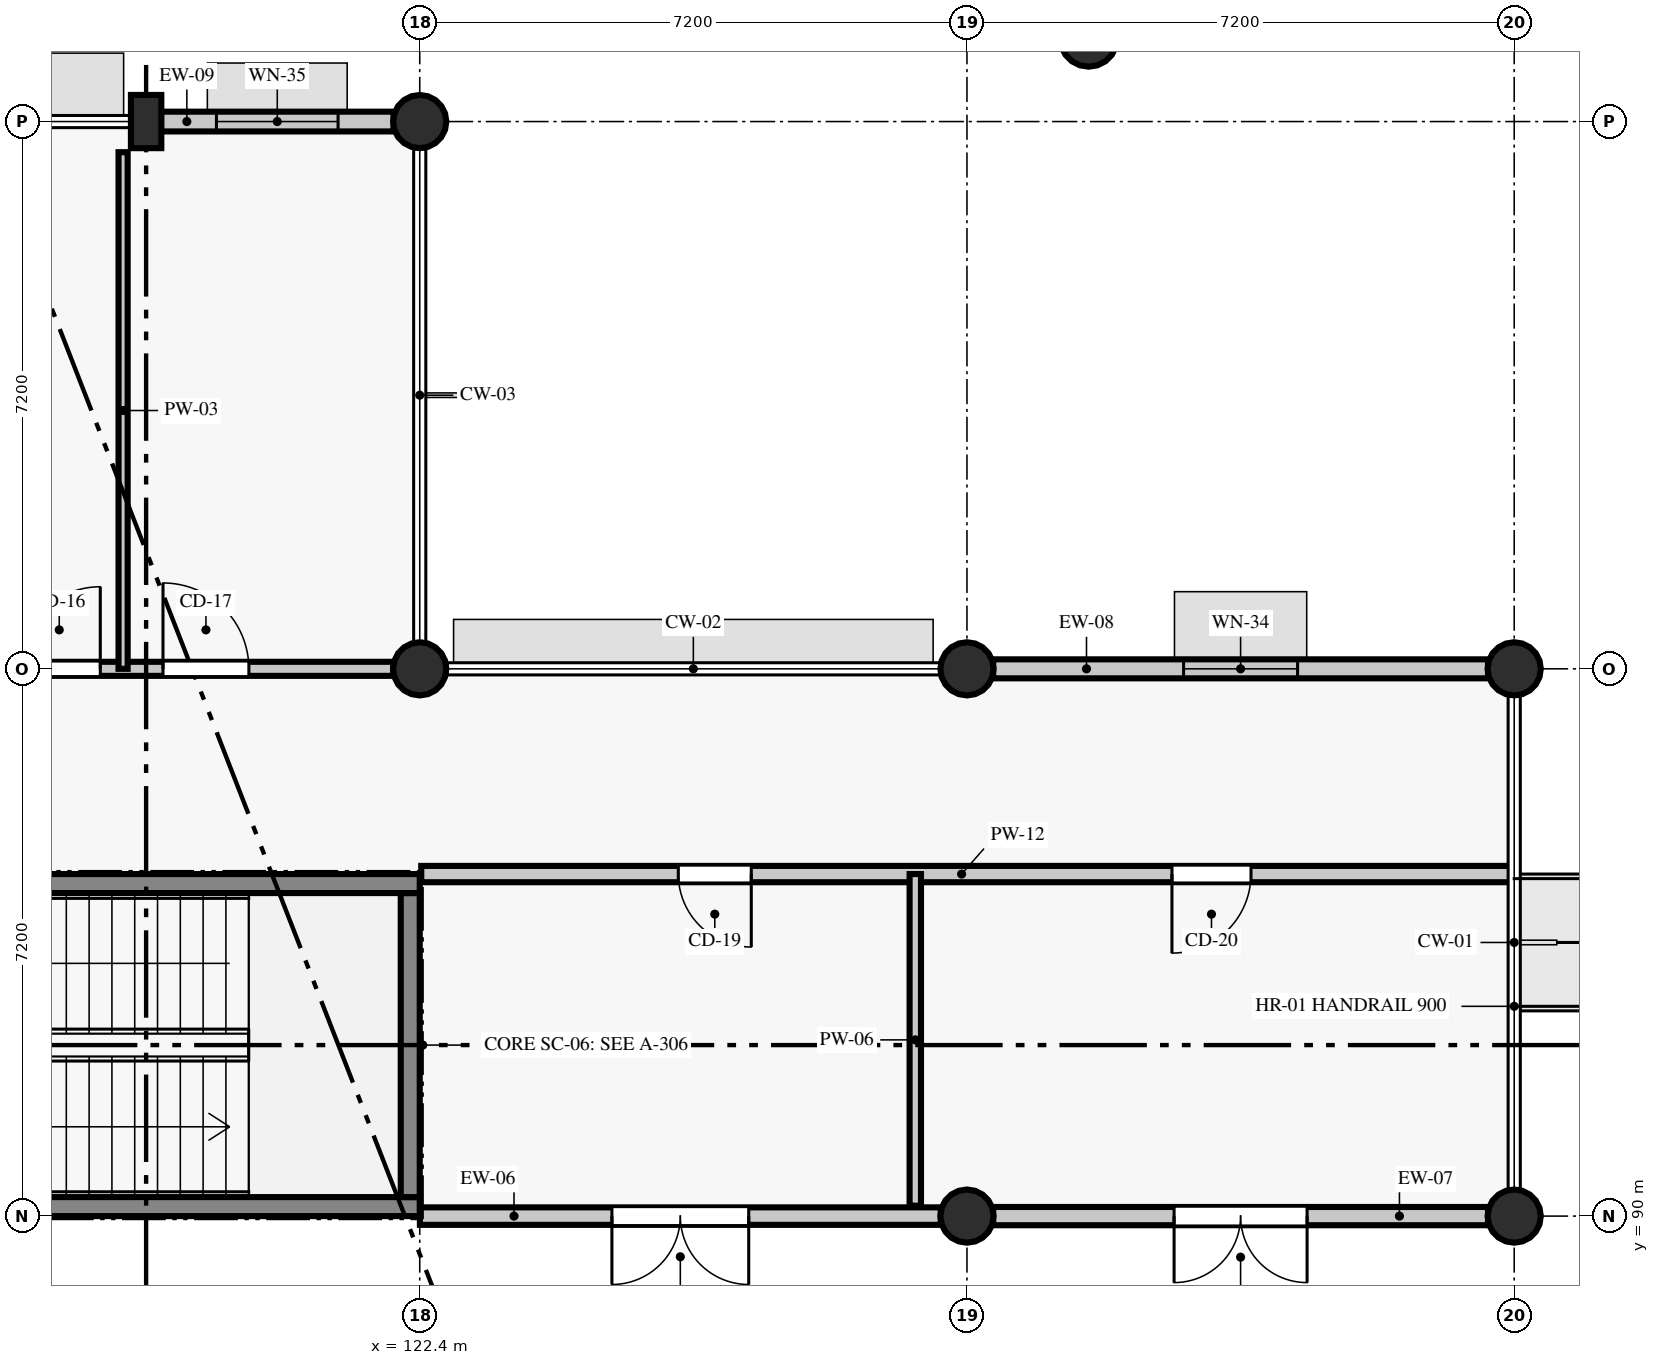
"""IFC4 building model, lengths in metres.
Left out: names, types, materials, properties, quantities, classifications, styles, units other than length and angle.
Written with IfcOpenShell. Run it as: python <this file> out.ifc"""

import sys

from ifc_helpers import new_model, si_unit, direction, frame, frame_2d, origin, origin_2d, place, context, subcontext, project, spatial, rectangle, circle, extrude, element, fill, save


model = new_model("IFC4")
c1 = context("Model", 3, precision=1e-05, world=origin(), true_north=direction((0.0, 1.0)))
c2 = subcontext(c1, "Body", "Model", "MODEL_VIEW")
j1 = project(units=[si_unit("LENGTHUNIT", "METRE"), si_unit("PLANEANGLEUNIT", "RADIAN")], contexts=[c1])
p1 = place(None, origin())
s1 = spatial("IfcSite", under=j1, at=p1, CompositionType="ELEMENT")
p2 = place(p1, origin())
s2 = spatial("IfcBuilding", under=s1, at=p2, CompositionType="ELEMENT")
p3 = place(p2, origin())
s3 = spatial("IfcBuildingStorey", under=s2, at=p3, CompositionType="ELEMENT", Elevation=0.0)
for number, where, z_axis, x_axis in (
    (1, (122.4, 97.2, 0.0), (0.0, 0.0, 1.0), (1.0, 0.0, 0.0)),
    (2, (122.4, 104.4, 0.0), (0.0, 0.0, 1.0), (1.0, 0.0, 0.0)),
    (3, (129.6, 90.0, 0.0), (0.0, 0.0, 1.0), (1.0, 0.0, 0.0)),
    (4, (129.6, 97.2, 0.0), (0.0, 0.0, 1.0), (1.0, 0.0, 0.0)),
    (5, (136.8, 90.0, 0.0), (0.0, 0.0, 1.0), (1.0, 0.0, 0.0)),
    (6, (136.8, 97.2, 0.0), (0.0, 0.0, 1.0), (1.0, 0.0, 0.0)),
):
    element("IfcColumn", number, at=place(p3, frame(where, z_axis=z_axis, x_axis=x_axis)), inside=s3, PredefinedType="COLUMN", context=c2, shape_type="SweptSolid", body=[
        extrude(circle(Radius=0.35, at=origin_2d()), origin(), (0.0, 0.0, 1.0), 4.535),
    ])
p4 = place(p3, frame((118.8, 104.4, 0.0), z_axis=(0.0, 0.0, 1.0), x_axis=(1.0, 0.0, 0.0)))
e7 = element("IfcColumn", 7, at=p4, inside=s3, PredefinedType="PILASTER", context=c2, shape_type="SweptSolid", body=[
    extrude(rectangle(XDim=0.4, YDim=0.7, at=origin_2d()), origin(), (0.0, 0.0, 1.0), 4.535),
])
p5 = place(p3, frame((131.201, 105.497, 0.0), z_axis=(0.0, 0.0, 1.0), x_axis=(1.0, 0.0, 0.0)))
e8 = element("IfcColumn", 8, at=p5, inside=s3, PredefinedType="COLUMN", context=c2, shape_type="SweptSolid", body=[
    extrude(circle(Radius=0.375, at=origin_2d()), origin(), (0.0, 0.0, 1.0), 4.8),
])
p6 = place(p3, frame((122.402, 90.0, 0.0), z_axis=(0.0, 0.0, 1.0), x_axis=(1.0, 0.0, 0.0)))
e9 = element("IfcWall", 9, at=p6, inside=s3, PredefinedType="STANDARD", context=c2, shape_type="SweptSolid", body=[
    extrude(rectangle(XDim=6.853, YDim=0.23, at=frame_2d((3.426, 0.0))), origin(), (0.0, 0.0, 1.0), 4.535),
])
p7 = place(p6, frame((2.527, 0.0, 0.0)))
e10 = element("IfcOpeningElement", 10, at=p7, cuts=e9, PredefinedType="OPENING", context=c2, shape_type="SweptSolid", body=[
    extrude(rectangle(XDim=1.8, YDim=2.25, at=frame_2d((0.9, 1.125))), frame((0.0, 0.125, 0.0), z_axis=(0.0, -1.0, 0.0), x_axis=(1.0, 0.0, 0.0)), (0.0, 0.0, 1.0), 0.25),
])
p8 = place(p3, frame((129.945, 90.0, 0.0), z_axis=(0.0, 0.0, 1.0), x_axis=(1.0, 0.0, 0.0)))
e11 = element("IfcWall", 11, at=p8, inside=s3, PredefinedType="STANDARD", context=c2, shape_type="SweptSolid", body=[
    extrude(rectangle(XDim=6.51, YDim=0.24, at=frame_2d((3.255, 0.0))), origin(), (0.0, 0.0, 1.0), 3.885),
])
p9 = place(p8, frame((2.38, 0.0, 0.0)))
e12 = element("IfcOpeningElement", 12, at=p9, cuts=e11, PredefinedType="OPENING", context=c2, shape_type="SweptSolid", body=[
    extrude(rectangle(XDim=1.75, YDim=2.22, at=frame_2d((0.875, 1.11))), frame((0.0, 0.13, 0.0), z_axis=(0.0, -1.0, 0.0), x_axis=(1.0, 0.0, 0.0)), (0.0, 0.0, 1.0), 0.26),
])
p10 = place(p3, frame((136.455, 97.2, 0.0), z_axis=(0.0, 0.0, 1.0), x_axis=(-1.0, 0.0, 0.0)))
e13 = element("IfcWall", 13, at=p10, inside=s3, PredefinedType="STANDARD", context=c2, shape_type="SweptSolid", body=[
    extrude(rectangle(XDim=6.51, YDim=0.25, at=frame_2d((3.255, 0.0))), origin(), (0.0, 0.0, 1.0), 3.885),
])
p11 = place(p10, frame((2.505, 0.0, 0.9)))
e14 = element("IfcOpeningElement", 14, at=p11, cuts=e13, PredefinedType="OPENING", context=c2, shape_type="SweptSolid", body=[
    extrude(rectangle(XDim=1.5, YDim=1.66, at=frame_2d((0.75, 0.83))), frame((0.0, 0.135, 0.0), z_axis=(0.0, -1.0, 0.0), x_axis=(1.0, 0.0, 0.0)), (0.0, 0.0, 1.0), 0.27),
])
p12 = place(p3, frame((122.055, 104.4, 0.0), z_axis=(0.0, 0.0, 1.0), x_axis=(-1.0, 0.0, 0.0)))
e15 = element("IfcWall", 15, at=p12, inside=s3, PredefinedType="STANDARD", context=c2, shape_type="SweptSolid", body=[
    extrude(rectangle(XDim=3.059, YDim=0.26, at=frame_2d((1.529, 0.0))), origin(), (0.0, 0.0, 1.0), 3.885),
])
p13 = place(p12, frame((0.729, 0.0, 0.9)))
e16 = element("IfcOpeningElement", 16, at=p13, cuts=e15, PredefinedType="OPENING", context=c2, shape_type="SweptSolid", body=[
    extrude(rectangle(XDim=1.6, YDim=1.66, at=frame_2d((0.8, 0.83))), frame((0.0, 0.14, 0.0), z_axis=(0.0, -1.0, 0.0), x_axis=(1.0, 0.0, 0.0)), (0.0, 0.0, 1.0), 0.28),
])
p14 = place(p3, frame((113.6, 90.125, 0.0), z_axis=(0.0, 0.0, 1.0), x_axis=(1.0, 0.0, 0.0)))
e17 = element("IfcWall", 17, at=p14, inside=s3, PredefinedType="SHEAR", context=c2, shape_type="SweptSolid", body=[
    extrude(rectangle(XDim=8.8, YDim=0.25, at=frame_2d((4.4, 0.0))), origin(), (0.0, 0.0, 1.0), 4.535),
])
p15 = place(p14, frame((0.25, 0.0, 0.0)))
e18 = element("IfcOpeningElement", 18, at=p15, cuts=e17, PredefinedType="OPENING", context=c2, shape_type="SweptSolid", body=[
    extrude(rectangle(XDim=1.85, YDim=2.2, at=frame_2d((0.925, 1.1))), frame((0.0, 0.135, 0.0), z_axis=(0.0, -1.0, 0.0), x_axis=(1.0, 0.0, 0.0)), (0.0, 0.0, 1.0), 0.27),
])
p16 = place(p3, frame((122.275, 90.25, 0.0), z_axis=(0.0, 0.0, 1.0), x_axis=(0.0, 1.0, 0.0)))
e19 = element("IfcWall", 19, at=p16, inside=s3, PredefinedType="SHEAR", context=c2, shape_type="SweptSolid", body=[
    extrude(rectangle(XDim=4.0, YDim=0.25, at=frame_2d((2.0, 0.0))), origin(), (0.0, 0.0, 1.0), 4.535),
])
p17 = place(p3, frame((122.4, 94.375, 0.0), z_axis=(0.0, 0.0, 1.0), x_axis=(-1.0, 0.0, 0.0)))
e20 = element("IfcWall", 20, at=p17, inside=s3, PredefinedType="SHEAR", context=c2, shape_type="SweptSolid", body=[
    extrude(rectangle(XDim=8.8, YDim=0.25, at=frame_2d((4.4, 0.0))), origin(), (0.0, 0.0, 1.0), 4.535),
])
p18 = place(p17, frame((7.0, 0.0, 0.0)))
e21 = element("IfcOpeningElement", 21, at=p18, cuts=e20, PredefinedType="OPENING", context=c2, shape_type="SweptSolid", body=[
    extrude(rectangle(XDim=1.5, YDim=2.15, at=frame_2d((0.75, 1.075))), frame((0.0, 0.135, 0.0), z_axis=(0.0, -1.0, 0.0), x_axis=(1.0, 0.0, 0.0)), (0.0, 0.0, 1.0), 0.27),
])
p19 = place(p3, frame((93.95, 97.2, 0.0), z_axis=(0.0, 0.0, 1.0), x_axis=(1.0, 0.0, 0.0)))
e22 = element("IfcWall", 22, at=p19, inside=s3, PredefinedType="PARTITIONING", context=c2, shape_type="SweptSolid", body=[
    extrude(rectangle(XDim=28.1, YDim=0.185, at=frame_2d((14.05, 0.0))), origin(), (0.0, 0.0, 1.0), 3.785),
])
p20 = place(p19, frame((2.837, 0.0, 0.0)))
e23 = element("IfcOpeningElement", 23, at=p20, cuts=e22, PredefinedType="OPENING", context=c2, shape_type="SweptSolid", body=[
    extrude(rectangle(XDim=1.05, YDim=2.13, at=frame_2d((0.525, 1.065))), frame((0.0, 0.103, 0.0), z_axis=(0.0, -1.0, 0.0), x_axis=(1.0, 0.0, 0.0)), (0.0, 0.0, 1.0), 0.205),
])
p21 = place(p19, frame((7.679, 0.0, 0.0)))
e24 = element("IfcOpeningElement", 24, at=p21, cuts=e22, PredefinedType="OPENING", context=c2, shape_type="SweptSolid", body=[
    extrude(rectangle(XDim=1.1, YDim=2.13, at=frame_2d((0.55, 1.065))), frame((0.0, 0.103, 0.0), z_axis=(0.0, -1.0, 0.0), x_axis=(1.0, 0.0, 0.0)), (0.0, 0.0, 1.0), 0.205),
])
p22 = place(p19, frame((9.747, 0.0, 0.0)))
e25 = element("IfcOpeningElement", 25, at=p22, cuts=e22, PredefinedType="OPENING", context=c2, shape_type="SweptSolid", body=[
    extrude(rectangle(XDim=1.15, YDim=2.13, at=frame_2d((0.575, 1.065))), frame((0.0, 0.103, 0.0), z_axis=(0.0, -1.0, 0.0), x_axis=(1.0, 0.0, 0.0)), (0.0, 0.0, 1.0), 0.205),
])
p23 = place(p19, frame((15.03, 0.0, 0.0)))
e26 = element("IfcOpeningElement", 26, at=p23, cuts=e22, PredefinedType="OPENING", context=c2, shape_type="SweptSolid", body=[
    extrude(rectangle(XDim=0.92, YDim=2.18, at=frame_2d((0.46, 1.09))), frame((0.0, 0.103, 0.0), z_axis=(0.0, -1.0, 0.0), x_axis=(1.0, 0.0, 0.0)), (0.0, 0.0, 1.0), 0.205),
])
p24 = place(p19, frame((17.15, 0.0, 0.0)))
e27 = element("IfcOpeningElement", 27, at=p24, cuts=e22, PredefinedType="OPENING", context=c2, shape_type="SweptSolid", body=[
    extrude(rectangle(XDim=0.94, YDim=2.08, at=frame_2d((0.47, 1.04))), frame((0.0, 0.103, 0.0), z_axis=(0.0, -1.0, 0.0), x_axis=(1.0, 0.0, 0.0)), (0.0, 0.0, 1.0), 0.205),
])
p25 = place(p19, frame((19.36, 0.0, 0.0)))
e28 = element("IfcOpeningElement", 28, at=p25, cuts=e22, PredefinedType="OPENING", context=c2, shape_type="SweptSolid", body=[
    extrude(rectangle(XDim=0.9, YDim=2.08, at=frame_2d((0.45, 1.04))), frame((0.0, 0.103, 0.0), z_axis=(0.0, -1.0, 0.0), x_axis=(1.0, 0.0, 0.0)), (0.0, 0.0, 1.0), 0.205),
])
p26 = place(p19, frame((23.167, 0.0, 0.0)))
e29 = element("IfcOpeningElement", 29, at=p26, cuts=e22, PredefinedType="OPENING", context=c2, shape_type="SweptSolid", body=[
    extrude(rectangle(XDim=1.08, YDim=2.18, at=frame_2d((0.54, 1.09))), frame((0.0, 0.103, 0.0), z_axis=(0.0, -1.0, 0.0), x_axis=(1.0, 0.0, 0.0)), (0.0, 0.0, 1.0), 0.205),
])
p27 = place(p19, frame((25.072, 0.0, 0.0)))
e30 = element("IfcOpeningElement", 30, at=p27, cuts=e22, PredefinedType="OPENING", context=c2, shape_type="SweptSolid", body=[
    extrude(rectangle(XDim=1.13, YDim=2.18, at=frame_2d((0.565, 1.09))), frame((0.0, 0.103, 0.0), z_axis=(0.0, -1.0, 0.0), x_axis=(1.0, 0.0, 0.0)), (0.0, 0.0, 1.0), 0.205),
])
p28 = place(p3, frame((118.497, 97.2, 0.0), z_axis=(0.0, 0.0, 1.0), x_axis=(0.0, 1.0, 0.0)))
e31 = element("IfcWall", 31, at=p28, inside=s3, PredefinedType="PARTITIONING", context=c2, shape_type="SweptSolid", body=[
    extrude(rectangle(XDim=6.797, YDim=0.12, at=frame_2d((3.398, 0.0))), origin(), (0.0, 0.0, 1.0), 3.785),
])
p29 = place(p3, frame((122.42, 94.5, 0.0), z_axis=(0.0, 0.0, 1.0), x_axis=(1.0, 0.0, 0.0)))
e32 = element("IfcWall", 32, at=p29, inside=s3, PredefinedType="PARTITIONING", context=c2, shape_type="SweptSolid", body=[
    extrude(rectangle(XDim=14.34, YDim=0.215, at=frame_2d((7.17, 0.0))), origin(), (0.0, 0.0, 1.0), 3.885),
])
p30 = place(p29, frame((3.382, 0.0, 0.0)))
e33 = element("IfcOpeningElement", 33, at=p30, cuts=e32, PredefinedType="OPENING", context=c2, shape_type="SweptSolid", body=[
    extrude(rectangle(XDim=0.96, YDim=2.23, at=frame_2d((0.48, 1.115))), frame((0.0, 0.117, 0.0), z_axis=(0.0, -1.0, 0.0), x_axis=(1.0, 0.0, 0.0)), (0.0, 0.0, 1.0), 0.235),
])
p31 = place(p29, frame((9.877, 0.0, 0.0)))
e34 = element("IfcOpeningElement", 34, at=p31, cuts=e32, PredefinedType="OPENING", context=c2, shape_type="SweptSolid", body=[
    extrude(rectangle(XDim=1.04, YDim=2.23, at=frame_2d((0.52, 1.115))), frame((0.0, 0.117, 0.0), z_axis=(0.0, -1.0, 0.0), x_axis=(1.0, 0.0, 0.0)), (0.0, 0.0, 1.0), 0.235),
])
p32 = place(p3, frame((128.92, 90.137, 0.0), z_axis=(0.0, 0.0, 1.0), x_axis=(0.0, 1.0, 0.0)))
e35 = element("IfcWall", 35, at=p32, inside=s3, PredefinedType="PARTITIONING", context=c2, shape_type="SweptSolid", body=[
    extrude(rectangle(XDim=4.363, YDim=0.15, at=frame_2d((2.182, 0.0))), origin(), (0.0, 0.0, 1.0), 4.535),
])
p33 = place(p7, frame((1.8, 0.0, 0.0), z_axis=(0.0, 0.0, 1.0), x_axis=(-1.0, 0.0, 0.0)))
e36 = element("IfcDoor", 36, at=p33, inside=s3, OperationType="DOUBLE_DOOR_SINGLE_SWING", PredefinedType="DOOR", context=c2, shape_type="SweptSolid", body=[
    extrude(rectangle(XDim=1.8, YDim=2.25, at=frame_2d((0.9, 1.125))), frame((0.0, 0.025, 0.0), z_axis=(0.0, -1.0, 0.0), x_axis=(1.0, 0.0, 0.0)), (0.0, 0.0, 1.0), 0.05),
])
fill(e10, e36)
p34 = place(p9, frame((1.75, 0.0, 0.0), z_axis=(0.0, 0.0, 1.0), x_axis=(-1.0, 0.0, 0.0)))
e37 = element("IfcDoor", 37, at=p34, inside=s3, OperationType="DOUBLE_DOOR_SINGLE_SWING", PredefinedType="DOOR", context=c2, shape_type="SweptSolid", body=[
    extrude(rectangle(XDim=1.75, YDim=2.22, at=frame_2d((0.875, 1.11))), frame((0.0, 0.025, 0.0), z_axis=(0.0, -1.0, 0.0), x_axis=(1.0, 0.0, 0.0)), (0.0, 0.0, 1.0), 0.05),
])
fill(e12, e37)
p35 = place(p11, origin())
e38 = element("IfcWindow", 38, at=p35, inside=s3, PartitioningType="SINGLE_PANEL", PredefinedType="WINDOW", context=c2, shape_type="SweptSolid", body=[
    extrude(rectangle(XDim=1.5, YDim=1.66, at=frame_2d((0.75, 0.83))), frame((0.0, 0.03, 0.0), z_axis=(0.0, -1.0, 0.0), x_axis=(1.0, 0.0, 0.0)), (0.0, 0.0, 1.0), 0.06),
])
fill(e14, e38)
p36 = place(p13, origin())
e39 = element("IfcWindow", 39, at=p36, inside=s3, PartitioningType="SINGLE_PANEL", PredefinedType="WINDOW", context=c2, shape_type="SweptSolid", body=[
    extrude(rectangle(XDim=1.6, YDim=1.66, at=frame_2d((0.8, 0.83))), frame((0.0, 0.03, 0.0), z_axis=(0.0, -1.0, 0.0), x_axis=(1.0, 0.0, 0.0)), (0.0, 0.0, 1.0), 0.06),
])
fill(e16, e39)
p37 = place(p26, origin())
e40 = element("IfcDoor", 40, at=p37, inside=s3, OperationType="SINGLE_SWING_RIGHT", PredefinedType="DOOR", context=c2, shape_type="SweptSolid", body=[
    extrude(rectangle(XDim=1.08, YDim=2.18, at=frame_2d((0.54, 1.09))), frame((0.0, 0.025, 0.0), z_axis=(0.0, -1.0, 0.0), x_axis=(1.0, 0.0, 0.0)), (0.0, 0.0, 1.0), 0.05),
])
fill(e29, e40)
p38 = place(p27, origin())
e41 = element("IfcDoor", 41, at=p38, inside=s3, OperationType="SINGLE_SWING_LEFT", PredefinedType="DOOR", context=c2, shape_type="SweptSolid", body=[
    extrude(rectangle(XDim=1.13, YDim=2.18, at=frame_2d((0.565, 1.09))), frame((0.0, 0.025, 0.0), z_axis=(0.0, -1.0, 0.0), x_axis=(1.0, 0.0, 0.0)), (0.0, 0.0, 1.0), 0.05),
])
fill(e30, e41)
p39 = place(p30, frame((0.96, 0.0, 0.0), z_axis=(0.0, 0.0, 1.0), x_axis=(-1.0, 0.0, 0.0)))
e42 = element("IfcDoor", 42, at=p39, inside=s3, OperationType="SINGLE_SWING_LEFT", PredefinedType="DOOR", context=c2, shape_type="SweptSolid", body=[
    extrude(rectangle(XDim=0.96, YDim=2.23, at=frame_2d((0.48, 1.115))), frame((0.0, 0.025, 0.0), z_axis=(0.0, -1.0, 0.0), x_axis=(1.0, 0.0, 0.0)), (0.0, 0.0, 1.0), 0.05),
])
fill(e33, e42)
p40 = place(p31, frame((1.04, 0.0, 0.0), z_axis=(0.0, 0.0, 1.0), x_axis=(-1.0, 0.0, 0.0)))
e43 = element("IfcDoor", 43, at=p40, inside=s3, OperationType="SINGLE_SWING_RIGHT", PredefinedType="DOOR", context=c2, shape_type="SweptSolid", body=[
    extrude(rectangle(XDim=1.04, YDim=2.23, at=frame_2d((0.52, 1.115))), frame((0.0, 0.025, 0.0), z_axis=(0.0, -1.0, 0.0), x_axis=(1.0, 0.0, 0.0)), (0.0, 0.0, 1.0), 0.05),
])
fill(e34, e43)
save(model, sys.argv[1])
